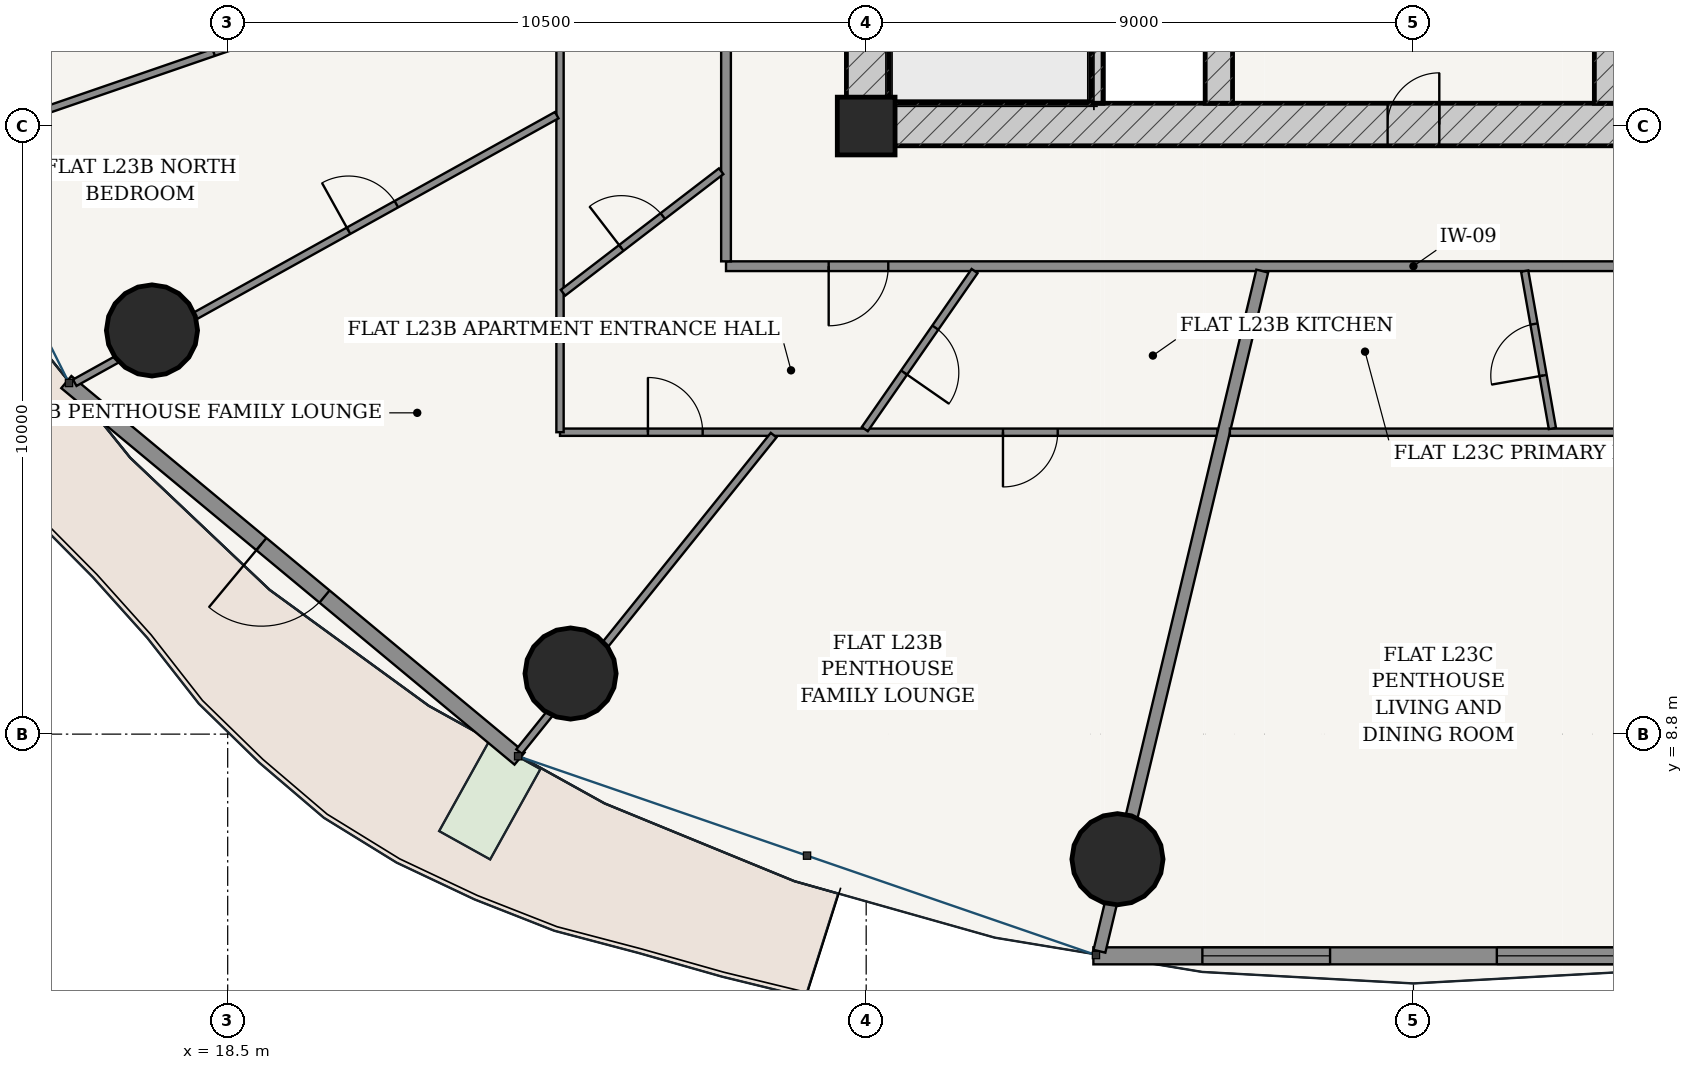
"""IFC4 building model, lengths in metres.
Left out: names, types, materials, properties, quantities, classifications, styles, units other than length and angle.
Written with IfcOpenShell. Run it as: python <this file> out.ifc"""

import sys

from ifc_helpers import new_model, si_unit, direction, frame, frame_2d, origin, origin_2d, place, context, subcontext, project, spatial, rectangle, hollow_circle, extrude, source, transform, mapped, element, fill, save


model = new_model("IFC4")
c1 = context("Model", 3, precision=1e-05, world=origin(), true_north=direction((-0.2419218956, 0.970295726276)))
c2 = subcontext(c1, "Body", "Model", "MODEL_VIEW")
j1 = project(units=[si_unit("LENGTHUNIT", "METRE"), si_unit("PLANEANGLEUNIT", "RADIAN")], contexts=[c1])
p1 = place(None, origin())
s1 = spatial("IfcSite", under=j1, at=p1, CompositionType="ELEMENT")
p2 = place(p1, origin())
s2 = spatial("IfcBuilding", under=s1, at=p2, CompositionType="ELEMENT")
p3 = place(p2, frame((0.0, 0.0, 90.6)))
s3 = spatial("IfcBuildingStorey", under=s2, at=p3, CompositionType="ELEMENT", Elevation=90.6)
p4 = place(p3, frame((29.0, 18.8, 0.0), z_axis=(0.0, 0.0, 1.0), x_axis=(1.0, 0.0, 0.0)))
e1 = element("IfcColumn", 1, at=p4, inside=s3, PredefinedType="COLUMN", context=c2, shape_type="SweptSolid", body=[
    extrude(rectangle(XDim=0.95, YDim=0.95, at=origin_2d()), origin(), (0.0, 0.0, 1.0), 3.6),
])
p5 = place(p3, frame((28.675, 18.825, 0.0), z_axis=(0.0, 0.0, 1.0), x_axis=(1.0, 0.0, 0.0)))
e2 = element("IfcWall", 2, at=p5, inside=s3, PredefinedType="SHEAR", context=c2, shape_type="SweptSolid", body=[
    extrude(rectangle(XDim=18.65, YDim=0.7, at=frame_2d((9.325, 0.0))), origin(), (0.0, 0.0, 1.0), 3.325),
])
p6 = place(p5, frame((8.9, 0.0, 0.0)))
e3 = element("IfcOpeningElement", 3, at=p6, cuts=e2, PredefinedType="OPENING", context=c2, shape_type="SweptSolid", body=[
    extrude(rectangle(XDim=0.85, YDim=2.1, at=frame_2d((0.425, 1.05))), frame((0.0, 0.36, 0.0), z_axis=(0.0, -1.0, 0.0), x_axis=(1.0, 0.0, 0.0)), (0.0, 0.0, 1.0), 0.72),
])
p7 = place(p3, frame((29.025, 19.175, 0.0), z_axis=(0.0, 0.0, 1.0), x_axis=(0.0, 1.0, 0.0)))
e4 = element("IfcWall", 4, at=p7, inside=s3, PredefinedType="SHEAR", context=c2, shape_type="SweptSolid", body=[
    extrude(rectangle(XDim=15.25, YDim=0.7, at=frame_2d((7.625, 0.0))), origin(), (0.0, 0.0, 1.0), 3.325),
])
p8 = place(p7, frame((9.875, 0.0, 0.0)))
e5 = element("IfcOpeningElement", 5, at=p8, cuts=e4, PredefinedType="OPENING", context=c2, shape_type="SweptSolid", body=[
    extrude(rectangle(XDim=1.5, YDim=2.2, at=frame_2d((0.75, 1.1))), frame((0.0, 0.36, 0.0), z_axis=(0.0, -1.0, 0.0), x_axis=(1.0, 0.0, 0.0)), (0.0, 0.0, 1.0), 0.72),
])
p9 = place(p3, frame((32.795, 19.175, 0.0), z_axis=(0.0, 0.0, 1.0), x_axis=(0.0, 1.0, 0.0)))
e6 = element("IfcWall", 6, at=p9, inside=s3, PredefinedType="SOLIDWALL", context=c2, shape_type="SweptSolid", body=[
    extrude(rectangle(XDim=7.375, YDim=0.2, at=frame_2d((3.688, 0.0))), origin(), (0.0, 0.0, 1.0), 3.325),
])
p10 = place(p3, frame((34.8, 19.175, 0.0), z_axis=(0.0, 0.0, 1.0), x_axis=(0.0, 1.0, 0.0)))
e7 = element("IfcWall", 7, at=p10, inside=s3, PredefinedType="SHEAR", context=c2, shape_type="SweptSolid", body=[
    extrude(rectangle(XDim=15.25, YDim=0.45, at=frame_2d((7.625, 0.0))), origin(), (0.0, 0.0, 1.0), 3.325),
])
p11 = place(p10, frame((7.8, 0.0, 0.0)))
e8 = element("IfcOpeningElement", 8, at=p11, cuts=e7, PredefinedType="OPENING", context=c2, shape_type="SweptSolid", body=[
    extrude(rectangle(XDim=1.05, YDim=2.15, at=frame_2d((0.525, 1.075))), frame((0.0, 0.235, 0.0), z_axis=(0.0, -1.0, 0.0), x_axis=(1.0, 0.0, 0.0)), (0.0, 0.0, 1.0), 0.47),
])
p12 = place(p3, frame((41.2, 19.175, 0.0), z_axis=(0.0, 0.0, 1.0), x_axis=(0.0, 1.0, 0.0)))
e9 = element("IfcWall", 9, at=p12, inside=s3, PredefinedType="SHEAR", context=c2, shape_type="SweptSolid", body=[
    extrude(rectangle(XDim=15.25, YDim=0.45, at=frame_2d((7.625, 0.0))), origin(), (0.0, 0.0, 1.0), 3.325),
])
p13 = place(p12, frame((7.8, 0.0, 0.0)))
e10 = element("IfcOpeningElement", 10, at=p13, cuts=e9, PredefinedType="OPENING", context=c2, shape_type="SweptSolid", body=[
    extrude(rectangle(XDim=1.05, YDim=2.15, at=frame_2d((0.525, 1.075))), frame((0.0, 0.235, 0.0), z_axis=(0.0, -1.0, 0.0), x_axis=(1.0, 0.0, 0.0)), (0.0, 0.0, 1.0), 0.47),
])
for number, where, z_axis, x_axis in (
    (11, (17.255, 15.438, 0.0), (0.0, 0.0, 1.0), (1.0, 0.0, 0.0)),
    (12, (24.138, 9.796, 0.0), (0.0, 0.0, 1.0), (1.0, 0.0, 0.0)),
    (13, (33.133, 6.743, 0.0), (0.0, 0.0, 1.0), (1.0, 0.0, 0.0)),
):
    element("IfcColumn", number, at=place(p3, frame(where, z_axis=z_axis, x_axis=x_axis)), inside=s3, PredefinedType="COLUMN", context=c2, shape_type="SweptSolid", body=[
        extrude(hollow_circle(Radius=0.75, WallThickness=0.045, at=origin_2d()), origin(), (0.0, 0.0, 1.0), 3.6),
    ])
p14 = place(p3, frame((15.846, 14.59, 0.0), z_axis=(0.0, 0.0, 1.0), x_axis=(0.769254958887, -0.638941944333, 0.0)))
e14 = element("IfcWall", 14, at=p14, inside=s3, PredefinedType="SOLIDWALL", context=c2, shape_type="SweptSolid", body=[
    extrude(rectangle(XDim=9.69, YDim=0.26, at=frame_2d((4.845, 0.0))), origin(), (0.0, 0.0, 1.0), 3.325),
])
p15 = place(p14, frame((4.17, 0.0, 0.0)))
e15 = element("IfcOpeningElement", 15, at=p15, cuts=e14, PredefinedType="OPENING", context=c2, shape_type="SweptSolid", body=[
    extrude(rectangle(XDim=1.35, YDim=2.2, at=frame_2d((0.675, 1.1))), frame((0.0, 0.14, 0.0), z_axis=(0.0, -1.0, 0.0), x_axis=(1.0, 0.0, 0.0)), (0.0, 0.0, 1.0), 0.28),
])
p16 = place(p3, frame((32.736, 5.154, 0.0), z_axis=(0.0, 0.0, 1.0), x_axis=(1.0, 0.0, 0.0)))
e16 = element("IfcWall", 16, at=p16, inside=s3, PredefinedType="SOLIDWALL", context=c2, shape_type="SweptSolid", body=[
    extrude(rectangle(XDim=10.527, YDim=0.28, at=frame_2d((5.264, 0.0))), origin(), (0.0, 0.0, 1.0), 3.325),
])
p17 = place(p16, frame((1.792, 0.0, 0.85)))
e17 = element("IfcOpeningElement", 17, at=p17, cuts=e16, PredefinedType="OPENING", context=c2, shape_type="SweptSolid", body=[
    extrude(rectangle(XDim=2.1, YDim=1.95, at=frame_2d((1.05, 0.975))), frame((0.0, 0.15, 0.0), z_axis=(0.0, -1.0, 0.0), x_axis=(1.0, 0.0, 0.0)), (0.0, 0.0, 1.0), 0.3),
])
p18 = place(p16, frame((6.635, 0.0, 0.85)))
e18 = element("IfcOpeningElement", 18, at=p18, cuts=e16, PredefinedType="OPENING", context=c2, shape_type="SweptSolid", body=[
    extrude(rectangle(XDim=2.1, YDim=1.95, at=frame_2d((1.05, 0.975))), frame((0.0, 0.15, 0.0), z_axis=(0.0, -1.0, 0.0), x_axis=(1.0, 0.0, 0.0)), (0.0, 0.0, 1.0), 0.3),
])
p19 = place(p3, frame((26.695, 16.495, 0.0), z_axis=(0.0, 0.0, 1.0), x_axis=(1.0, 0.0, 0.0)))
e19 = element("IfcWall", 19, at=p19, inside=s3, PredefinedType="PARTITIONING", context=c2, shape_type="SweptSolid", body=[
    extrude(rectangle(XDim=22.61, YDim=0.16, at=frame_2d((11.305, 0.0))), origin(), (0.0, 0.0, 1.0), 2.767),
])
p20 = place(p19, frame((1.688, 0.0, 0.0)))
e20 = element("IfcOpeningElement", 20, at=p20, cuts=e19, PredefinedType="OPENING", context=c2, shape_type="SweptSolid", body=[
    extrude(rectangle(XDim=0.98, YDim=2.2, at=frame_2d((0.49, 1.1))), frame((0.0, 0.09, 0.0), z_axis=(0.0, -1.0, 0.0), x_axis=(1.0, 0.0, 0.0)), (0.0, 0.0, 1.0), 0.18),
])
p21 = place(p19, frame((16.137, 0.0, 0.0)))
e21 = element("IfcOpeningElement", 21, at=p21, cuts=e19, PredefinedType="OPENING", context=c2, shape_type="SweptSolid", body=[
    extrude(rectangle(XDim=0.98, YDim=2.2, at=frame_2d((0.49, 1.1))), frame((0.0, 0.09, 0.0), z_axis=(0.0, -1.0, 0.0), x_axis=(1.0, 0.0, 0.0)), (0.0, 0.0, 1.0), 0.18),
])
p22 = place(p3, frame((26.695, 16.575, 0.0), z_axis=(0.0, 0.0, 1.0), x_axis=(0.0, 1.0, 0.0)))
e22 = element("IfcWall", 22, at=p22, inside=s3, PredefinedType="PARTITIONING", context=c2, shape_type="SweptSolid", body=[
    extrude(rectangle(XDim=20.45, YDim=0.16, at=frame_2d((10.225, 0.0))), origin(), (0.0, 0.0, 1.0), 2.767),
])
p23 = place(p3, frame((34.777, 13.765, 0.0), z_axis=(0.0, 0.0, 1.0), x_axis=(-1.0, 0.0, 0.0)))
e23 = element("IfcWall", 23, at=p23, inside=s3, PredefinedType="PARTITIONING", context=c2, shape_type="SweptSolid", body=[
    extrude(rectangle(XDim=10.812, YDim=0.12, at=frame_2d((5.406, 0.0))), origin(), (0.0, 0.0, 1.0), 2.767),
])
p24 = place(p23, frame((8.466, 0.0, 0.0)))
e24 = element("IfcOpeningElement", 24, at=p24, cuts=e23, PredefinedType="OPENING", context=c2, shape_type="SweptSolid", body=[
    extrude(rectangle(XDim=0.9, YDim=2.15, at=frame_2d((0.45, 1.075))), frame((0.0, 0.07, 0.0), z_axis=(0.0, -1.0, 0.0), x_axis=(1.0, 0.0, 0.0)), (0.0, 0.0, 1.0), 0.14),
])
p25 = place(p23, frame((2.628, 0.0, 0.0)))
e25 = element("IfcOpeningElement", 25, at=p25, cuts=e23, PredefinedType="OPENING", context=c2, shape_type="SweptSolid", body=[
    extrude(rectangle(XDim=0.9, YDim=2.15, at=frame_2d((0.45, 1.075))), frame((0.0, 0.07, 0.0), z_axis=(0.0, -1.0, 0.0), x_axis=(1.0, 0.0, 0.0)), (0.0, 0.0, 1.0), 0.14),
])
p26 = place(p3, frame((23.965, 13.765, 0.0), z_axis=(0.0, 0.0, 1.0), x_axis=(0.0, 1.0, 0.0)))
e26 = element("IfcWall", 26, at=p26, inside=s3, PredefinedType="PARTITIONING", context=c2, shape_type="SweptSolid", body=[
    extrude(rectangle(XDim=20.725, YDim=0.12, at=frame_2d((10.362, 0.0))), origin(), (0.0, 0.0, 1.0), 2.767),
])
p27 = place(p26, frame((9.401, 0.0, 0.0)))
e27 = element("IfcOpeningElement", 27, at=p27, cuts=e26, PredefinedType="OPENING", context=c2, shape_type="SweptSolid", body=[
    extrude(rectangle(XDim=0.9, YDim=2.15, at=frame_2d((0.45, 1.075))), frame((0.0, 0.07, 0.0), z_axis=(0.0, -1.0, 0.0), x_axis=(1.0, 0.0, 0.0)), (0.0, 0.0, 1.0), 0.14),
])
p28 = place(p26, frame((18.157, 0.0, 0.0)))
e28 = element("IfcOpeningElement", 28, at=p28, cuts=e26, PredefinedType="OPENING", context=c2, shape_type="SweptSolid", body=[
    extrude(rectangle(XDim=0.86, YDim=2.15, at=frame_2d((0.43, 1.075))), frame((0.0, 0.07, 0.0), z_axis=(0.0, -1.0, 0.0), x_axis=(1.0, 0.0, 0.0)), (0.0, 0.0, 1.0), 0.14),
])
p29 = place(p26, frame((14.376, 0.0, 0.0)))
e29 = element("IfcOpeningElement", 29, at=p29, cuts=e26, PredefinedType="OPENING", context=c2, shape_type="SweptSolid", body=[
    extrude(rectangle(XDim=0.9, YDim=2.15, at=frame_2d((0.45, 1.075))), frame((0.0, 0.07, 0.0), z_axis=(0.0, -1.0, 0.0), x_axis=(1.0, 0.0, 0.0)), (0.0, 0.0, 1.0), 0.14),
])
p30 = place(p3, frame((23.906, 21.95, 0.0), z_axis=(0.0, 0.0, 1.0), x_axis=(-0.945573120726, -0.32540970078, 0.0)))
e30 = element("IfcWall", 30, at=p30, inside=s3, PredefinedType="PARTITIONING", context=c2, shape_type="SweptSolid", body=[
    extrude(rectangle(XDim=11.022, YDim=0.12, at=frame_2d((5.511, 0.0))), origin(), (0.0, 0.0, 1.0), 2.767),
])
p31 = place(p30, frame((5.061, 0.0, 0.0)))
e31 = element("IfcOpeningElement", 31, at=p31, cuts=e30, PredefinedType="OPENING", context=c2, shape_type="SweptSolid", body=[
    extrude(rectangle(XDim=0.9, YDim=2.15, at=frame_2d((0.45, 1.075))), frame((0.0, 0.07, 0.0), z_axis=(0.0, -1.0, 0.0), x_axis=(1.0, 0.0, 0.0)), (0.0, 0.0, 1.0), 0.14),
])
p32 = place(p3, frame((23.911, 18.979, 0.0), z_axis=(0.0, 0.0, 1.0), x_axis=(-0.874313476423, -0.485361664066, 0.0)))
e32 = element("IfcWall", 32, at=p32, inside=s3, PredefinedType="PARTITIONING", context=c2, shape_type="SweptSolid", body=[
    extrude(rectangle(XDim=9.066, YDim=0.12, at=frame_2d((4.533, 0.0))), origin(), (0.0, 0.0, 1.0), 2.767),
])
p33 = place(p32, frame((3.016, 0.0, 0.0)))
e33 = element("IfcOpeningElement", 33, at=p33, cuts=e32, PredefinedType="OPENING", context=c2, shape_type="SweptSolid", body=[
    extrude(rectangle(XDim=0.9, YDim=2.15, at=frame_2d((0.45, 1.075))), frame((0.0, 0.07, 0.0), z_axis=(0.0, -1.0, 0.0), x_axis=(1.0, 0.0, 0.0)), (0.0, 0.0, 1.0), 0.14),
])
p34 = place(p3, frame((27.478, 13.717, 0.0), z_axis=(0.0, 0.0, 1.0), x_axis=(-0.626707979732, -0.77925419995, 0.0)))
e34 = element("IfcWall", 34, at=p34, inside=s3, PredefinedType="PARTITIONING", context=c2, shape_type="SweptSolid", body=[
    extrude(rectangle(XDim=6.679, YDim=0.12, at=frame_2d((3.339, 0.0))), origin(), (0.0, 0.0, 1.0), 2.767),
])
p35 = place(p3, frame((26.615, 18.056, 0.0), z_axis=(0.0, 0.0, 1.0), x_axis=(-0.79311360735, -0.609073727751, 0.0)))
e35 = element("IfcWall", 35, at=p35, inside=s3, PredefinedType="PARTITIONING", context=c2, shape_type="SweptSolid", body=[
    extrude(rectangle(XDim=3.279, YDim=0.12, at=frame_2d((1.64, 0.0))), origin(), (0.0, 0.0, 1.0), 3.004),
])
p36 = place(p35, frame((1.21, 0.0, 0.0)))
e36 = element("IfcOpeningElement", 36, at=p36, cuts=e35, PredefinedType="OPENING", context=c2, shape_type="SweptSolid", body=[
    extrude(rectangle(XDim=0.86, YDim=2.15, at=frame_2d((0.43, 1.075))), frame((0.0, 0.07, 0.0), z_axis=(0.0, -1.0, 0.0), x_axis=(1.0, 0.0, 0.0)), (0.0, 0.0, 1.0), 0.14),
])
p37 = place(p3, frame((30.783, 16.415, 0.0), z_axis=(0.0, 0.0, 1.0), x_axis=(-0.570653089326, -0.821191239385, 0.0)))
e37 = element("IfcWall", 37, at=p37, inside=s3, PredefinedType="PARTITIONING", context=c2, shape_type="SweptSolid", body=[
    extrude(rectangle(XDim=3.165, YDim=0.12, at=frame_2d((1.583, 0.0))), origin(), (0.0, 0.0, 1.0), 3.004),
])
p38 = place(p37, frame((1.133, 0.0, 0.0)))
e38 = element("IfcOpeningElement", 38, at=p38, cuts=e37, PredefinedType="OPENING", context=c2, shape_type="SweptSolid", body=[
    extrude(rectangle(XDim=0.9, YDim=2.15, at=frame_2d((0.45, 1.075))), frame((0.0, 0.07, 0.0), z_axis=(0.0, -1.0, 0.0), x_axis=(1.0, 0.0, 0.0)), (0.0, 0.0, 1.0), 0.14),
])
p39 = place(p3, frame((35.514, 16.415, 0.0), z_axis=(0.0, 0.0, 1.0), x_axis=(-0.232829417917, -0.972517589636, 0.0)))
e39 = element("IfcWall", 39, at=p39, inside=s3, PredefinedType="PARTITIONING", context=c2, shape_type="SweptSolid", body=[
    extrude(rectangle(XDim=11.502, YDim=0.2, at=frame_2d((5.751, 0.0))), origin(), (0.0, 0.0, 1.0), 2.767),
])
p40 = place(p3, frame((52.035, 13.765, 0.0), z_axis=(0.0, 0.0, 1.0), x_axis=(-1.0, 0.0, 0.0)))
e40 = element("IfcWall", 40, at=p40, inside=s3, PredefinedType="PARTITIONING", context=c2, shape_type="SweptSolid", body=[
    extrude(rectangle(XDim=17.054, YDim=0.12, at=frame_2d((8.527, 0.0))), origin(), (0.0, 0.0, 1.0), 2.767),
])
p41 = place(p40, frame((7.203, 0.0, 0.0)))
e41 = element("IfcOpeningElement", 41, at=p41, cuts=e40, PredefinedType="OPENING", context=c2, shape_type="SweptSolid", body=[
    extrude(rectangle(XDim=0.9, YDim=2.15, at=frame_2d((0.45, 1.075))), frame((0.0, 0.07, 0.0), z_axis=(0.0, -1.0, 0.0), x_axis=(1.0, 0.0, 0.0)), (0.0, 0.0, 1.0), 0.14),
])
p42 = place(p3, frame((39.829, 16.415, 0.0), z_axis=(0.0, 0.0, 1.0), x_axis=(0.173488627881, -0.984835872618, 0.0)))
e42 = element("IfcWall", 42, at=p42, inside=s3, PredefinedType="PARTITIONING", context=c2, shape_type="SweptSolid", body=[
    extrude(rectangle(XDim=2.629, YDim=0.12, at=frame_2d((1.314, 0.0))), origin(), (0.0, 0.0, 1.0), 3.325),
])
p43 = place(p42, frame((0.885, 0.0, 0.0)))
e43 = element("IfcOpeningElement", 43, at=p43, cuts=e42, PredefinedType="OPENING", context=c2, shape_type="SweptSolid", body=[
    extrude(rectangle(XDim=0.86, YDim=2.15, at=frame_2d((0.43, 1.075))), frame((0.0, 0.07, 0.0), z_axis=(0.0, -1.0, 0.0), x_axis=(1.0, 0.0, 0.0)), (0.0, 0.0, 1.0), 0.14),
])
m1 = source(origin(), c2, "Body", "SweptSolid", [
    extrude(rectangle(XDim=1.35, YDim=2.2, at=frame_2d((0.675, 1.1))), frame((0.0, 0.025, 0.0), z_axis=(0.0, -1.0, 0.0), x_axis=(1.0, 0.0, 0.0)), (0.0, 0.0, 1.0), 0.05),
])
p44 = place(p15, frame((1.35, 0.0, 0.0), z_axis=(0.0, 0.0, 1.0), x_axis=(-1.0, 0.0, 0.0)))
e44 = element("IfcDoor", 44, at=p44, inside=s3, OperationType="SINGLE_SWING_RIGHT", PredefinedType="DOOR", context=c2, shape_type="MappedRepresentation", body=[
    mapped(m1, transform((0.0, 0.0, 0.0), scale=1.0)),
])
fill(e15, e44)
m2 = source(origin(), c2, "Body", "SweptSolid", [
    extrude(rectangle(XDim=2.1, YDim=1.95, at=frame_2d((1.05, 0.975))), frame((0.0, 0.03, 0.0), z_axis=(0.0, -1.0, 0.0), x_axis=(1.0, 0.0, 0.0)), (0.0, 0.0, 1.0), 0.06),
])
p45 = place(p17, origin())
e45 = element("IfcWindow", 45, at=p45, inside=s3, PartitioningType="SINGLE_PANEL", PredefinedType="WINDOW", context=c2, shape_type="MappedRepresentation", body=[
    mapped(m2, transform((0.0, 0.0, 0.0), scale=1.0)),
])
fill(e17, e45)
p46 = place(p18, origin())
e46 = element("IfcWindow", 46, at=p46, inside=s3, PartitioningType="SINGLE_PANEL", PredefinedType="WINDOW", context=c2, shape_type="MappedRepresentation", body=[
    mapped(m2, transform((0.0, 0.0, 0.0), scale=1.0)),
])
fill(e18, e46)
m3 = source(origin(), c2, "Body", "SweptSolid", [
    extrude(rectangle(XDim=0.85, YDim=2.1, at=frame_2d((0.425, 1.05))), frame((0.0, 0.025, 0.0), z_axis=(0.0, -1.0, 0.0), x_axis=(1.0, 0.0, 0.0)), (0.0, 0.0, 1.0), 0.05),
])
p47 = place(p6, origin())
e47 = element("IfcDoor", 47, at=p47, inside=s3, OperationType="SINGLE_SWING_RIGHT", PredefinedType="DOOR", context=c2, shape_type="MappedRepresentation", body=[
    mapped(m3, transform((0.0, 0.0, 0.0), scale=1.0)),
])
fill(e3, e47)
m4 = source(origin(), c2, "Body", "SweptSolid", [
    extrude(rectangle(XDim=0.98, YDim=2.2, at=frame_2d((0.49, 1.1))), frame((0.0, 0.025, 0.0), z_axis=(0.0, -1.0, 0.0), x_axis=(1.0, 0.0, 0.0)), (0.0, 0.0, 1.0), 0.05),
])
p48 = place(p20, frame((0.98, 0.0, 0.0), z_axis=(0.0, 0.0, 1.0), x_axis=(-1.0, 0.0, 0.0)))
e48 = element("IfcDoor", 48, at=p48, inside=s3, OperationType="SINGLE_SWING_RIGHT", PredefinedType="DOOR", context=c2, shape_type="MappedRepresentation", body=[
    mapped(m4, transform((0.0, 0.0, 0.0), scale=1.0)),
])
fill(e20, e48)
m5 = source(origin(), c2, "Body", "SweptSolid", [
    extrude(rectangle(XDim=0.86, YDim=2.15, at=frame_2d((0.43, 1.075))), frame((0.0, 0.025, 0.0), z_axis=(0.0, -1.0, 0.0), x_axis=(1.0, 0.0, 0.0)), (0.0, 0.0, 1.0), 0.05),
])
p49 = place(p36, frame((0.86, 0.0, 0.0), z_axis=(0.0, 0.0, 1.0), x_axis=(-1.0, 0.0, 0.0)))
e49 = element("IfcDoor", 49, at=p49, inside=s3, OperationType="SINGLE_SWING_LEFT", PredefinedType="DOOR", context=c2, shape_type="MappedRepresentation", body=[
    mapped(m5, transform((0.0, 0.0, 0.0), scale=1.0)),
])
fill(e36, e49)
m6 = source(origin(), c2, "Body", "SweptSolid", [
    extrude(rectangle(XDim=0.9, YDim=2.15, at=frame_2d((0.45, 1.075))), frame((0.0, 0.025, 0.0), z_axis=(0.0, -1.0, 0.0), x_axis=(1.0, 0.0, 0.0)), (0.0, 0.0, 1.0), 0.05),
])
p50 = place(p38, origin())
e50 = element("IfcDoor", 50, at=p50, inside=s3, OperationType="SINGLE_SWING_RIGHT", PredefinedType="DOOR", context=c2, shape_type="MappedRepresentation", body=[
    mapped(m6, transform((0.0, 0.0, 0.0), scale=1.0)),
])
fill(e38, e50)
p51 = place(p24, frame((0.9, 0.0, 0.0), z_axis=(0.0, 0.0, 1.0), x_axis=(-1.0, 0.0, 0.0)))
e51 = element("IfcDoor", 51, at=p51, inside=s3, OperationType="SINGLE_SWING_LEFT", PredefinedType="DOOR", context=c2, shape_type="MappedRepresentation", body=[
    mapped(m6, transform((0.0, 0.0, 0.0), scale=1.0)),
])
fill(e24, e51)
p52 = place(p25, origin())
e52 = element("IfcDoor", 52, at=p52, inside=s3, OperationType="SINGLE_SWING_RIGHT", PredefinedType="DOOR", context=c2, shape_type="MappedRepresentation", body=[
    mapped(m6, transform((0.0, 0.0, 0.0), scale=1.0)),
])
fill(e25, e52)
p53 = place(p33, frame((0.9, 0.0, 0.0), z_axis=(0.0, 0.0, 1.0), x_axis=(-1.0, 0.0, 0.0)))
e53 = element("IfcDoor", 53, at=p53, inside=s3, OperationType="SINGLE_SWING_LEFT", PredefinedType="DOOR", context=c2, shape_type="MappedRepresentation", body=[
    mapped(m6, transform((0.0, 0.0, 0.0), scale=1.0)),
])
fill(e33, e53)
p54 = place(p31, frame((0.9, 0.0, 0.0), z_axis=(0.0, 0.0, 1.0), x_axis=(-1.0, 0.0, 0.0)))
e54 = element("IfcDoor", 54, at=p54, inside=s3, OperationType="SINGLE_SWING_RIGHT", PredefinedType="DOOR", context=c2, shape_type="MappedRepresentation", body=[
    mapped(m6, transform((0.0, 0.0, 0.0), scale=1.0)),
])
fill(e31, e54)
p55 = place(p43, frame((0.86, 0.0, 0.0), z_axis=(0.0, 0.0, 1.0), x_axis=(-1.0, 0.0, 0.0)))
e55 = element("IfcDoor", 55, at=p55, inside=s3, OperationType="SINGLE_SWING_LEFT", PredefinedType="DOOR", context=c2, shape_type="MappedRepresentation", body=[
    mapped(m5, transform((0.0, 0.0, 0.0), scale=1.0)),
])
fill(e43, e55)
save(model, sys.argv[1])
